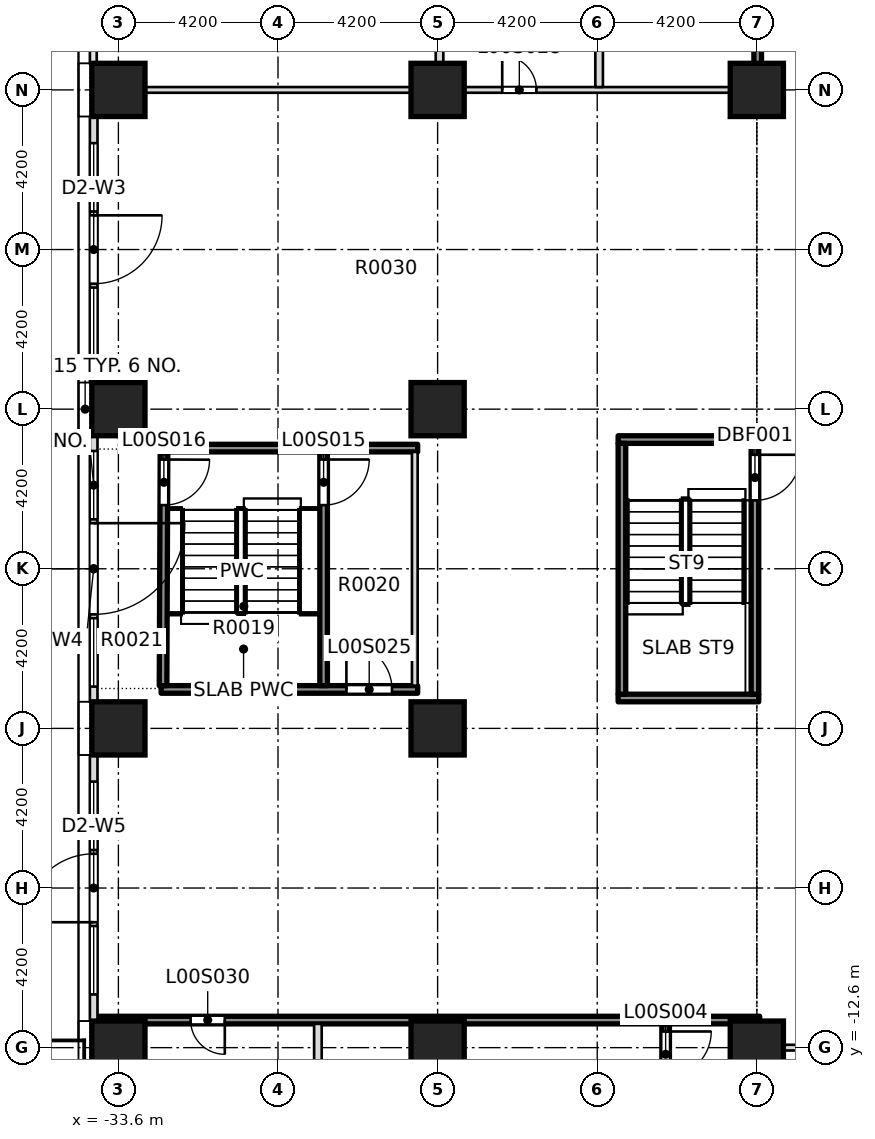
"""IFC4 building model, lengths in metres.
Left out: names, types, materials, properties, quantities, classifications, styles, units other than length and angle.
Written with IfcOpenShell. Run it as: python <this file> out.ifc"""

import sys

from ifc_helpers import new_model, si_unit, direction, frame, frame_2d, origin, origin_2d, place, context, subcontext, project, spatial, rectangle, extrude, element, fill, save


model = new_model("IFC4")
c1 = context("Model", 3, precision=1e-05, world=origin(), true_north=direction((0.0, 1.0)))
c2 = subcontext(c1, "Body", "Model", "MODEL_VIEW")
j1 = project(units=[si_unit("LENGTHUNIT", "METRE"), si_unit("PLANEANGLEUNIT", "RADIAN")], contexts=[c1])
p1 = place(None, origin())
s1 = spatial("IfcSite", under=j1, at=p1, CompositionType="ELEMENT")
p2 = place(p1, origin())
s2 = spatial("IfcBuilding", under=s1, at=p2, CompositionType="ELEMENT")
p3 = place(p2, origin())
s3 = spatial("IfcBuildingStorey", under=s2, at=p3, CompositionType="ELEMENT", Elevation=0.0)
for number, where, z_axis, x_axis in (
    (1, (-25.2, -12.6, -0.45), (0.0, 0.0, 1.0), (1.0, 0.0, 0.0)),
    (2, (-16.8, -12.6, -0.45), (0.0, 0.0, 1.0), (1.0, 0.0, 0.0)),
    (3, (-25.2, -4.2, -0.45), (0.0, 0.0, 1.0), (1.0, 0.0, 0.0)),
    (4, (-25.2, 4.2, -0.45), (0.0, 0.0, 1.0), (1.0, 0.0, 0.0)),
    (5, (-25.2, 12.6, -0.45), (0.0, 0.0, 1.0), (1.0, 0.0, 0.0)),
    (6, (-16.8, 12.6, -0.45), (0.0, 0.0, 1.0), (1.0, 0.0, 0.0)),
):
    element("IfcColumn", number, at=place(p3, frame(where, z_axis=z_axis, x_axis=x_axis)), inside=s3, PredefinedType="COLUMN", context=c2, shape_type="SweptSolid", body=[
        extrude(rectangle(XDim=1.4, YDim=1.4, at=origin_2d()), origin(), (0.0, 0.0, 1.0), 7.55),
    ])
for number, where, z_axis, x_axis in (
    (7, (-33.6, -12.6, 0.0), (0.0, 0.0, 1.0), (1.0, 0.0, 0.0)),
    (8, (-33.6, -4.2, 0.0), (0.0, 0.0, 1.0), (1.0, 0.0, 0.0)),
    (9, (-33.6, 4.2, 0.0), (0.0, 0.0, 1.0), (1.0, 0.0, 0.0)),
    (10, (-33.6, 12.6, 0.0), (0.0, 0.0, 1.0), (1.0, 0.0, 0.0)),
):
    element("IfcColumn", number, at=place(p3, frame(where, z_axis=z_axis, x_axis=x_axis)), inside=s3, PredefinedType="COLUMN", context=c2, shape_type="SweptSolid", body=[
        extrude(rectangle(XDim=1.4, YDim=1.4, at=origin_2d()), origin(), (0.0, 0.0, 1.0), 7.5),
    ])
p4 = place(p3, frame((-16.9, -12.6, 0.0), z_axis=(0.0, 0.0, 1.0), x_axis=(1.0, 0.0, 0.0)))
e11 = element("IfcWall", 11, at=p4, inside=s3, PredefinedType="PARTITIONING", context=c2, shape_type="SweptSolid", body=[
    extrude(rectangle(XDim=9.625, YDim=0.15, at=frame_2d((4.812, 0.0))), origin(), (0.0, 0.0, 1.0), 7.1),
])
p5 = place(p3, frame((-34.15, -11.875, 0.0), z_axis=(0.0, 0.0, 1.0), x_axis=(1.0, 0.0, 0.0)))
e12 = element("IfcWall", 12, at=p5, inside=s3, PredefinedType="SOLIDWALL", context=c2, shape_type="SweptSolid", body=[
    extrude(rectangle(XDim=17.425, YDim=0.2, at=frame_2d((8.712, 0.0))), origin(), (0.0, 0.0, 1.0), 7.1),
])
p6 = place(p5, frame((2.45, 0.0, 0.0)))
e13 = element("IfcOpeningElement", 13, at=p6, cuts=e12, PredefinedType="OPENING", context=c2, shape_type="SweptSolid", body=[
    extrude(rectangle(XDim=0.9, YDim=2.1, at=frame_2d((0.45, 1.05))), frame((0.0, 0.11, 0.0), z_axis=(0.0, -1.0, 0.0), x_axis=(1.0, 0.0, 0.0)), (0.0, 0.0, 1.0), 0.22),
])
p7 = place(p3, frame((-32.475, -3.175, 0.0), z_axis=(0.0, 0.0, 1.0), x_axis=(1.0, 0.0, 0.0)))
e14 = element("IfcWall", 14, at=p7, inside=s3, PredefinedType="SOLIDWALL", context=c2, shape_type="SweptSolid", body=[
    extrude(rectangle(XDim=6.75, YDim=0.2, at=frame_2d((3.375, 0.0))), origin(), (0.0, 0.0, 1.0), 7.1),
])
p8 = place(p7, frame((4.875, 0.0, 0.0)))
e15 = element("IfcOpeningElement", 15, at=p8, cuts=e14, PredefinedType="OPENING", context=c2, shape_type="SweptSolid", body=[
    extrude(rectangle(XDim=1.2, YDim=2.1, at=frame_2d((0.6, 1.05))), frame((0.0, 0.11, 0.0), z_axis=(0.0, -1.0, 0.0), x_axis=(1.0, 0.0, 0.0)), (0.0, 0.0, 1.0), 0.22),
])
p9 = place(p3, frame((-32.475, 3.175, 0.0), z_axis=(0.0, 0.0, 1.0), x_axis=(1.0, 0.0, 0.0)))
e16 = element("IfcWall", 16, at=p9, inside=s3, PredefinedType="SOLIDWALL", context=c2, shape_type="SweptSolid", body=[
    extrude(rectangle(XDim=6.75, YDim=0.2, at=frame_2d((3.375, 0.0))), origin(), (0.0, 0.0, 1.0), 7.1),
])
p10 = place(p3, frame((-34.15, 12.6, 0.0), z_axis=(0.0, 0.0, 1.0), x_axis=(1.0, 0.0, 0.0)))
e17 = element("IfcWall", 17, at=p10, inside=s3, PredefinedType="PARTITIONING", context=c2, shape_type="SweptSolid", body=[
    extrude(rectangle(XDim=17.425, YDim=0.15, at=frame_2d((8.712, 0.0))), origin(), (0.0, 0.0, 1.0), 7.1),
])
p11 = place(p10, frame((10.65, 0.0, 0.0)))
e18 = element("IfcOpeningElement", 18, at=p11, cuts=e17, PredefinedType="OPENING", context=c2, shape_type="SweptSolid", body=[
    extrude(rectangle(XDim=0.9, YDim=2.1, at=frame_2d((0.45, 1.05))), frame((0.0, 0.085, 0.0), z_axis=(0.0, -1.0, 0.0), x_axis=(1.0, 0.0, 0.0)), (0.0, 0.0, 1.0), 0.17),
])
p12 = place(p3, frame((-32.425, -3.075, 0.0), z_axis=(0.0, 0.0, 1.0), x_axis=(0.004065655173, 0.99999173519, 0.0)))
e19 = element("IfcWall", 19, at=p12, inside=s3, PredefinedType="SOLIDWALL", context=c2, shape_type="SweptSolid", body=[
    extrude(rectangle(XDim=6.125, YDim=0.2, at=frame_2d((3.062, 0.0))), origin(), (0.0, 0.0, 1.0), 7.1),
])
p13 = place(p12, frame((4.75, 0.0, 0.0)))
e20 = element("IfcOpeningElement", 20, at=p13, cuts=e19, PredefinedType="OPENING", context=c2, shape_type="SweptSolid", body=[
    extrude(rectangle(XDim=1.2, YDim=2.1, at=frame_2d((0.6, 1.05))), frame((0.0, 0.11, 0.0), z_axis=(0.0, -1.0, 0.0), x_axis=(1.0, 0.0, 0.0)), (0.0, 0.0, 1.0), 0.22),
])
p14 = place(p3, frame((-28.35, -18.125, 0.0), z_axis=(0.0, 0.0, 1.0), x_axis=(0.0, 1.0, 0.0)))
e21 = element("IfcWall", 21, at=p14, inside=s3, PredefinedType="PARTITIONING", context=c2, shape_type="SweptSolid", body=[
    extrude(rectangle(XDim=6.15, YDim=0.2, at=frame_2d((3.075, 0.0))), origin(), (0.0, 0.0, 1.0), 7.1),
])
p15 = place(p3, frame((-28.2, -3.075, 0.0), z_axis=(0.0, 0.0, 1.0), x_axis=(0.0, 1.0, 0.0)))
e22 = element("IfcWall", 22, at=p15, inside=s3, PredefinedType="SOLIDWALL", context=c2, shape_type="SweptSolid", body=[
    extrude(rectangle(XDim=6.15, YDim=0.2, at=frame_2d((3.075, 0.0))), origin(), (0.0, 0.0, 1.0), 7.1),
])
p16 = place(p15, frame((4.75, 0.0, 0.0)))
e23 = element("IfcOpeningElement", 23, at=p16, cuts=e22, PredefinedType="OPENING", context=c2, shape_type="SweptSolid", body=[
    extrude(rectangle(XDim=1.2, YDim=2.1, at=frame_2d((0.6, 1.05))), frame((0.0, 0.11, 0.0), z_axis=(0.0, -1.0, 0.0), x_axis=(1.0, 0.0, 0.0)), (0.0, 0.0, 1.0), 0.22),
])
p17 = place(p3, frame((-25.8, -3.075, 0.0), z_axis=(0.0, 0.0, 1.0), x_axis=(0.0, 1.0, 0.0)))
e24 = element("IfcWall", 24, at=p17, inside=s3, PredefinedType="PARTITIONING", context=c2, shape_type="SweptSolid", body=[
    extrude(rectangle(XDim=6.15, YDim=0.15, at=frame_2d((3.075, 0.0))), origin(), (0.0, 0.0, 1.0), 7.1),
])
p18 = place(p3, frame((-25.2, -18.125, 0.0), z_axis=(0.0, 0.0, 1.0), x_axis=(0.0, 1.0, 0.0)))
e25 = element("IfcWall", 25, at=p18, inside=s3, PredefinedType="SOLIDWALL", context=c2, shape_type="SweptSolid", body=[
    extrude(rectangle(XDim=6.15, YDim=0.2, at=frame_2d((3.075, 0.0))), origin(), (0.0, 0.0, 1.0), 7.1),
])
for number, where, z_axis, x_axis in (
    (26, (-25.15, 12.675, 0.0), (0.0, 0.0, 1.0), (0.0, 1.0, 0.0)),
    (27, (-20.95, 12.675, 0.0), (0.0, 0.0, 1.0), (0.0, 1.0, 0.0)),
):
    element("IfcWall", number, at=place(p3, frame(where, z_axis=z_axis, x_axis=x_axis)), inside=s3, PredefinedType="PARTITIONING", context=c2, shape_type="SweptSolid", body=[
        extrude(rectangle(XDim=9.0, YDim=0.2, at=frame_2d((4.5, 0.0))), origin(), (0.0, 0.0, 1.0), 7.1),
    ])
p19 = place(p3, frame((-19.2, -18.125, 0.0), z_axis=(0.0, 0.0, 1.0), x_axis=(0.0, 1.0, 0.0)))
e28 = element("IfcWall", 28, at=p19, inside=s3, PredefinedType="SOLIDWALL", context=c2, shape_type="SweptSolid", body=[
    extrude(rectangle(XDim=6.15, YDim=0.2, at=frame_2d((3.075, 0.0))), origin(), (0.0, 0.0, 1.0), 7.1),
])
p20 = place(p19, frame((4.75, 0.0, 0.0)))
e29 = element("IfcOpeningElement", 29, at=p20, cuts=e28, PredefinedType="OPENING", context=c2, shape_type="SweptSolid", body=[
    extrude(rectangle(XDim=1.2, YDim=2.1, at=frame_2d((0.6, 1.05))), frame((0.0, 0.11, 0.0), z_axis=(0.0, -1.0, 0.0), x_axis=(1.0, 0.0, 0.0)), (0.0, 0.0, 1.0), 0.22),
])
p21 = place(p3, frame((-16.8, -18.125, 0.0), z_axis=(0.0, 0.0, 1.0), x_axis=(0.0, 1.0, 0.0)))
e30 = element("IfcWall", 30, at=p21, inside=s3, PredefinedType="PARTITIONING", context=c2, shape_type="SweptSolid", body=[
    extrude(rectangle(XDim=5.45, YDim=0.2, at=frame_2d((2.725, 0.0))), origin(), (0.0, 0.0, 1.0), 7.1),
])
p22 = place(p3, frame((-16.775, -12.525, 0.0), z_axis=(0.0, 0.0, 1.0), x_axis=(-0.043289881256, 0.999062553688, 0.0)))
e31 = element("IfcWall", 31, at=p22, inside=s3, PredefinedType="SOLIDWALL", context=c2, shape_type="SweptSolid", body=[
    extrude(rectangle(XDim=0.575, YDim=0.2, at=frame_2d((0.288, 0.0))), origin(), (0.0, 0.0, 1.0), 7.1),
])
p23 = place(p3, frame((-16.775, 12.675, 0.0), z_axis=(0.0, 0.0, 1.0), x_axis=(-0.002759281819, 0.999996193175, 0.0)))
e32 = element("IfcWall", 32, at=p23, inside=s3, PredefinedType="SOLIDWALL", context=c2, shape_type="SweptSolid", body=[
    extrude(rectangle(XDim=9.025, YDim=0.2, at=frame_2d((4.512, 0.0))), origin(), (0.0, 0.0, 1.0), 7.1),
])
p24 = place(p3, frame((-34.25, 4.9, 0.0), z_axis=(0.0, 0.0, 1.0), x_axis=(0.0, 1.0, 0.0)))
e33 = element("IfcWall", 33, at=p24, inside=s3, PredefinedType="STANDARD", context=c2, shape_type="SweptSolid", body=[
    extrude(rectangle(XDim=7.0, YDim=0.2, at=frame_2d((3.5, 0.0))), origin(), (0.0, 0.0, 1.0), 7.1),
])
p25 = place(p24, frame((4.5, 0.0, 0.3)))
e34 = element("IfcOpeningElement", 34, at=p25, cuts=e33, PredefinedType="OPENING", context=c2, shape_type="SweptSolid", body=[
    extrude(rectangle(XDim=1.8, YDim=4.2, at=frame_2d((0.9, 2.1))), frame((0.0, 0.11, 0.0), z_axis=(0.0, -1.0, 0.0), x_axis=(1.0, 0.0, 0.0)), (0.0, 0.0, 1.0), 0.22),
])
p26 = place(p24, frame((2.6, 0.0, 0.0)))
e35 = element("IfcOpeningElement", 35, at=p26, cuts=e33, PredefinedType="OPENING", context=c2, shape_type="SweptSolid", body=[
    extrude(rectangle(XDim=1.8, YDim=2.4, at=frame_2d((0.9, 1.2))), frame((0.0, 0.11, 0.0), z_axis=(0.0, -1.0, 0.0), x_axis=(1.0, 0.0, 0.0)), (0.0, 0.0, 1.0), 0.22),
])
p27 = place(p24, frame((0.7, 0.0, 0.3)))
e36 = element("IfcOpeningElement", 36, at=p27, cuts=e33, PredefinedType="OPENING", context=c2, shape_type="SweptSolid", body=[
    extrude(rectangle(XDim=1.8, YDim=4.2, at=frame_2d((0.9, 2.1))), frame((0.0, 0.11, 0.0), z_axis=(0.0, -1.0, 0.0), x_axis=(1.0, 0.0, 0.0)), (0.0, 0.0, 1.0), 0.22),
])
p28 = place(p3, frame((-34.25, -3.5, 0.0), z_axis=(0.0, 0.0, 1.0), x_axis=(0.0, 1.0, 0.0)))
e37 = element("IfcWall", 37, at=p28, inside=s3, PredefinedType="STANDARD", context=c2, shape_type="SweptSolid", body=[
    extrude(rectangle(XDim=7.0, YDim=0.2, at=frame_2d((3.5, 0.0))), origin(), (0.0, 0.0, 1.0), 7.1),
])
p29 = place(p28, frame((4.8, 0.0, 0.3)))
e38 = element("IfcOpeningElement", 38, at=p29, cuts=e37, PredefinedType="OPENING", context=c2, shape_type="SweptSolid", body=[
    extrude(rectangle(XDim=1.8, YDim=4.2, at=frame_2d((0.9, 2.1))), frame((0.0, 0.11, 0.0), z_axis=(0.0, -1.0, 0.0), x_axis=(1.0, 0.0, 0.0)), (0.0, 0.0, 1.0), 0.22),
])
p30 = place(p28, frame((2.3, 0.0, 0.0)))
e39 = element("IfcOpeningElement", 39, at=p30, cuts=e37, PredefinedType="OPENING", context=c2, shape_type="SweptSolid", body=[
    extrude(rectangle(XDim=2.4, YDim=2.4, at=frame_2d((1.2, 1.2))), frame((0.0, 0.11, 0.0), z_axis=(0.0, -1.0, 0.0), x_axis=(1.0, 0.0, 0.0)), (0.0, 0.0, 1.0), 0.22),
])
p31 = place(p28, frame((0.4, 0.0, 0.3)))
e40 = element("IfcOpeningElement", 40, at=p31, cuts=e37, PredefinedType="OPENING", context=c2, shape_type="SweptSolid", body=[
    extrude(rectangle(XDim=1.8, YDim=4.2, at=frame_2d((0.9, 2.1))), frame((0.0, 0.11, 0.0), z_axis=(0.0, -1.0, 0.0), x_axis=(1.0, 0.0, 0.0)), (0.0, 0.0, 1.0), 0.22),
])
p32 = place(p3, frame((-34.25, -11.9, 0.0), z_axis=(0.0, 0.0, 1.0), x_axis=(0.0, 1.0, 0.0)))
e41 = element("IfcWall", 41, at=p32, inside=s3, PredefinedType="STANDARD", context=c2, shape_type="SweptSolid", body=[
    extrude(rectangle(XDim=7.0, YDim=0.2, at=frame_2d((3.5, 0.0))), origin(), (0.0, 0.0, 1.0), 7.1),
])
p33 = place(p32, frame((4.5, 0.0, 0.3)))
e42 = element("IfcOpeningElement", 42, at=p33, cuts=e41, PredefinedType="OPENING", context=c2, shape_type="SweptSolid", body=[
    extrude(rectangle(XDim=1.8, YDim=4.2, at=frame_2d((0.9, 2.1))), frame((0.0, 0.11, 0.0), z_axis=(0.0, -1.0, 0.0), x_axis=(1.0, 0.0, 0.0)), (0.0, 0.0, 1.0), 0.22),
])
p34 = place(p32, frame((2.6, 0.0, 0.0)))
e43 = element("IfcOpeningElement", 43, at=p34, cuts=e41, PredefinedType="OPENING", context=c2, shape_type="SweptSolid", body=[
    extrude(rectangle(XDim=1.8, YDim=2.4, at=frame_2d((0.9, 1.2))), frame((0.0, 0.11, 0.0), z_axis=(0.0, -1.0, 0.0), x_axis=(1.0, 0.0, 0.0)), (0.0, 0.0, 1.0), 0.22),
])
p35 = place(p32, frame((0.7, 0.0, 0.3)))
e44 = element("IfcOpeningElement", 44, at=p35, cuts=e41, PredefinedType="OPENING", context=c2, shape_type="SweptSolid", body=[
    extrude(rectangle(XDim=1.8, YDim=4.2, at=frame_2d((0.9, 2.1))), frame((0.0, 0.11, 0.0), z_axis=(0.0, -1.0, 0.0), x_axis=(1.0, 0.0, 0.0)), (0.0, 0.0, 1.0), 0.22),
])
for number, where, z_axis, x_axis in (
    (45, (-20.45, -3.4, 0.0), (0.0, 0.0, 1.0), (1.0, 0.0, 0.0)),
    (46, (-20.45, 3.4, 0.0), (0.0, 0.0, 1.0), (1.0, 0.0, 0.0)),
):
    element("IfcWall", number, at=place(p3, frame(where, z_axis=z_axis, x_axis=x_axis)), inside=s3, PredefinedType="SOLIDWALL", context=c2, shape_type="SweptSolid", body=[
        extrude(rectangle(XDim=3.7, YDim=0.2, at=frame_2d((1.85, 0.0))), origin(), (0.0, 0.0, 1.0), 7.1),
    ])
p36 = place(p3, frame((-20.35, -3.3, 0.0), z_axis=(0.0, 0.0, 1.0), x_axis=(0.0, 1.0, 0.0)))
e47 = element("IfcWall", 47, at=p36, inside=s3, PredefinedType="SOLIDWALL", context=c2, shape_type="SweptSolid", body=[
    extrude(rectangle(XDim=6.6, YDim=0.2, at=frame_2d((3.3, 0.0))), origin(), (0.0, 0.0, 1.0), 7.1),
])
p37 = place(p3, frame((-16.85, -3.3, 0.0), z_axis=(0.0, 0.0, 1.0), x_axis=(0.0, 1.0, 0.0)))
e48 = element("IfcWall", 48, at=p37, inside=s3, PredefinedType="SOLIDWALL", context=c2, shape_type="SweptSolid", body=[
    extrude(rectangle(XDim=6.6, YDim=0.2, at=frame_2d((3.3, 0.0))), origin(), (0.0, 0.0, 1.0), 7.1),
])
p38 = place(p37, frame((5.1, 0.0, 0.0)))
e49 = element("IfcOpeningElement", 49, at=p38, cuts=e48, PredefinedType="OPENING", context=c2, shape_type="SweptSolid", body=[
    extrude(rectangle(XDim=1.2, YDim=2.1, at=frame_2d((0.6, 1.05))), frame((0.0, 0.11, 0.0), z_axis=(0.0, -1.0, 0.0), x_axis=(1.0, 0.0, 0.0)), (0.0, 0.0, 1.0), 0.22),
])
p39 = place(p20, origin())
e50 = element("IfcDoor", 50, at=p39, inside=s3, OperationType="DOUBLE_DOOR_SINGLE_SWING", PredefinedType="DOOR", context=c2, shape_type="SweptSolid", body=[
    extrude(rectangle(XDim=1.2, YDim=2.1, at=frame_2d((0.6, 1.05))), frame((0.0, 0.025, 0.0), z_axis=(0.0, -1.0, 0.0), x_axis=(1.0, 0.0, 0.0)), (0.0, 0.0, 1.0), 0.05),
])
fill(e29, e50)
p40 = place(p16, origin())
e51 = element("IfcDoor", 51, at=p40, inside=s3, OperationType="DOUBLE_DOOR_SINGLE_SWING", PredefinedType="DOOR", context=c2, shape_type="SweptSolid", body=[
    extrude(rectangle(XDim=1.2, YDim=2.1, at=frame_2d((0.6, 1.05))), frame((0.0, 0.025, 0.0), z_axis=(0.0, -1.0, 0.0), x_axis=(1.0, 0.0, 0.0)), (0.0, 0.0, 1.0), 0.05),
])
fill(e23, e51)
p41 = place(p13, origin())
e52 = element("IfcDoor", 52, at=p41, inside=s3, OperationType="DOUBLE_DOOR_SINGLE_SWING", PredefinedType="DOOR", context=c2, shape_type="SweptSolid", body=[
    extrude(rectangle(XDim=1.2, YDim=2.1, at=frame_2d((0.6, 1.05))), frame((0.0, 0.025, 0.0), z_axis=(0.0, -1.0, 0.0), x_axis=(1.0, 0.0, 0.0)), (0.0, 0.0, 1.0), 0.05),
])
fill(e20, e52)
p42 = place(p8, origin())
e53 = element("IfcDoor", 53, at=p42, inside=s3, OperationType="SINGLE_SWING_LEFT", PredefinedType="DOOR", context=c2, shape_type="SweptSolid", body=[
    extrude(rectangle(XDim=1.2, YDim=2.1, at=frame_2d((0.6, 1.05))), frame((0.0, 0.025, 0.0), z_axis=(0.0, -1.0, 0.0), x_axis=(1.0, 0.0, 0.0)), (0.0, 0.0, 1.0), 0.05),
])
fill(e15, e53)
p43 = place(p11, origin())
e54 = element("IfcDoor", 54, at=p43, inside=s3, OperationType="SINGLE_SWING_RIGHT", PredefinedType="DOOR", context=c2, shape_type="SweptSolid", body=[
    extrude(rectangle(XDim=0.9, YDim=2.1, at=frame_2d((0.45, 1.05))), frame((0.0, 0.025, 0.0), z_axis=(0.0, -1.0, 0.0), x_axis=(1.0, 0.0, 0.0)), (0.0, 0.0, 1.0), 0.05),
])
fill(e18, e54)
p44 = place(p6, origin())
e55 = element("IfcDoor", 55, at=p44, inside=s3, OperationType="SINGLE_SWING_LEFT", PredefinedType="DOOR", context=c2, shape_type="SweptSolid", body=[
    extrude(rectangle(XDim=0.9, YDim=2.1, at=frame_2d((0.45, 1.05))), frame((0.0, 0.025, 0.0), z_axis=(0.0, -1.0, 0.0), x_axis=(1.0, 0.0, 0.0)), (0.0, 0.0, 1.0), 0.05),
])
fill(e13, e55)
p45 = place(p25, origin())
e56 = element("IfcWindow", 56, at=p45, inside=s3, PartitioningType="SINGLE_PANEL", PredefinedType="WINDOW", context=c2, shape_type="SweptSolid", body=[
    extrude(rectangle(XDim=1.8, YDim=4.2, at=frame_2d((0.9, 2.1))), frame((0.0, 0.03, 0.0), z_axis=(0.0, -1.0, 0.0), x_axis=(1.0, 0.0, 0.0)), (0.0, 0.0, 1.0), 0.06),
])
fill(e34, e56)
p46 = place(p26, origin())
e57 = element("IfcDoor", 57, at=p46, inside=s3, OperationType="SINGLE_SWING_LEFT", PredefinedType="DOOR", context=c2, shape_type="SweptSolid", body=[
    extrude(rectangle(XDim=1.8, YDim=2.4, at=frame_2d((0.9, 1.2))), frame((0.0, 0.025, 0.0), z_axis=(0.0, -1.0, 0.0), x_axis=(1.0, 0.0, 0.0)), (0.0, 0.0, 1.0), 0.05),
])
fill(e35, e57)
p47 = place(p27, origin())
e58 = element("IfcWindow", 58, at=p47, inside=s3, PartitioningType="SINGLE_PANEL", PredefinedType="WINDOW", context=c2, shape_type="SweptSolid", body=[
    extrude(rectangle(XDim=1.8, YDim=4.2, at=frame_2d((0.9, 2.1))), frame((0.0, 0.03, 0.0), z_axis=(0.0, -1.0, 0.0), x_axis=(1.0, 0.0, 0.0)), (0.0, 0.0, 1.0), 0.06),
])
fill(e36, e58)
p48 = place(p29, origin())
e59 = element("IfcWindow", 59, at=p48, inside=s3, PartitioningType="SINGLE_PANEL", PredefinedType="WINDOW", context=c2, shape_type="SweptSolid", body=[
    extrude(rectangle(XDim=1.8, YDim=4.2, at=frame_2d((0.9, 2.1))), frame((0.0, 0.03, 0.0), z_axis=(0.0, -1.0, 0.0), x_axis=(1.0, 0.0, 0.0)), (0.0, 0.0, 1.0), 0.06),
])
fill(e38, e59)
p49 = place(p30, origin())
e60 = element("IfcDoor", 60, at=p49, inside=s3, OperationType="SINGLE_SWING_LEFT", PredefinedType="DOOR", context=c2, shape_type="SweptSolid", body=[
    extrude(rectangle(XDim=2.4, YDim=2.4, at=frame_2d((1.2, 1.2))), frame((0.0, 0.025, 0.0), z_axis=(0.0, -1.0, 0.0), x_axis=(1.0, 0.0, 0.0)), (0.0, 0.0, 1.0), 0.05),
])
fill(e39, e60)
p50 = place(p31, origin())
e61 = element("IfcWindow", 61, at=p50, inside=s3, PartitioningType="SINGLE_PANEL", PredefinedType="WINDOW", context=c2, shape_type="SweptSolid", body=[
    extrude(rectangle(XDim=1.8, YDim=4.2, at=frame_2d((0.9, 2.1))), frame((0.0, 0.03, 0.0), z_axis=(0.0, -1.0, 0.0), x_axis=(1.0, 0.0, 0.0)), (0.0, 0.0, 1.0), 0.06),
])
fill(e40, e61)
p51 = place(p33, origin())
e62 = element("IfcWindow", 62, at=p51, inside=s3, PartitioningType="SINGLE_PANEL", PredefinedType="WINDOW", context=c2, shape_type="SweptSolid", body=[
    extrude(rectangle(XDim=1.8, YDim=4.2, at=frame_2d((0.9, 2.1))), frame((0.0, 0.03, 0.0), z_axis=(0.0, -1.0, 0.0), x_axis=(1.0, 0.0, 0.0)), (0.0, 0.0, 1.0), 0.06),
])
fill(e42, e62)
p52 = place(p34, origin())
e63 = element("IfcDoor", 63, at=p52, inside=s3, OperationType="SINGLE_SWING_LEFT", PredefinedType="DOOR", context=c2, shape_type="SweptSolid", body=[
    extrude(rectangle(XDim=1.8, YDim=2.4, at=frame_2d((0.9, 1.2))), frame((0.0, 0.025, 0.0), z_axis=(0.0, -1.0, 0.0), x_axis=(1.0, 0.0, 0.0)), (0.0, 0.0, 1.0), 0.05),
])
fill(e43, e63)
p53 = place(p35, origin())
e64 = element("IfcWindow", 64, at=p53, inside=s3, PartitioningType="SINGLE_PANEL", PredefinedType="WINDOW", context=c2, shape_type="SweptSolid", body=[
    extrude(rectangle(XDim=1.8, YDim=4.2, at=frame_2d((0.9, 2.1))), frame((0.0, 0.03, 0.0), z_axis=(0.0, -1.0, 0.0), x_axis=(1.0, 0.0, 0.0)), (0.0, 0.0, 1.0), 0.06),
])
fill(e44, e64)
p54 = place(p38, origin())
e65 = element("IfcDoor", 65, at=p54, inside=s3, OperationType="SINGLE_SWING_LEFT", PredefinedType="DOOR", context=c2, shape_type="SweptSolid", body=[
    extrude(rectangle(XDim=1.2, YDim=2.1, at=frame_2d((0.6, 1.05))), frame((0.0, 0.025, 0.0), z_axis=(0.0, -1.0, 0.0), x_axis=(1.0, 0.0, 0.0)), (0.0, 0.0, 1.0), 0.05),
])
fill(e49, e65)
save(model, sys.argv[1])
